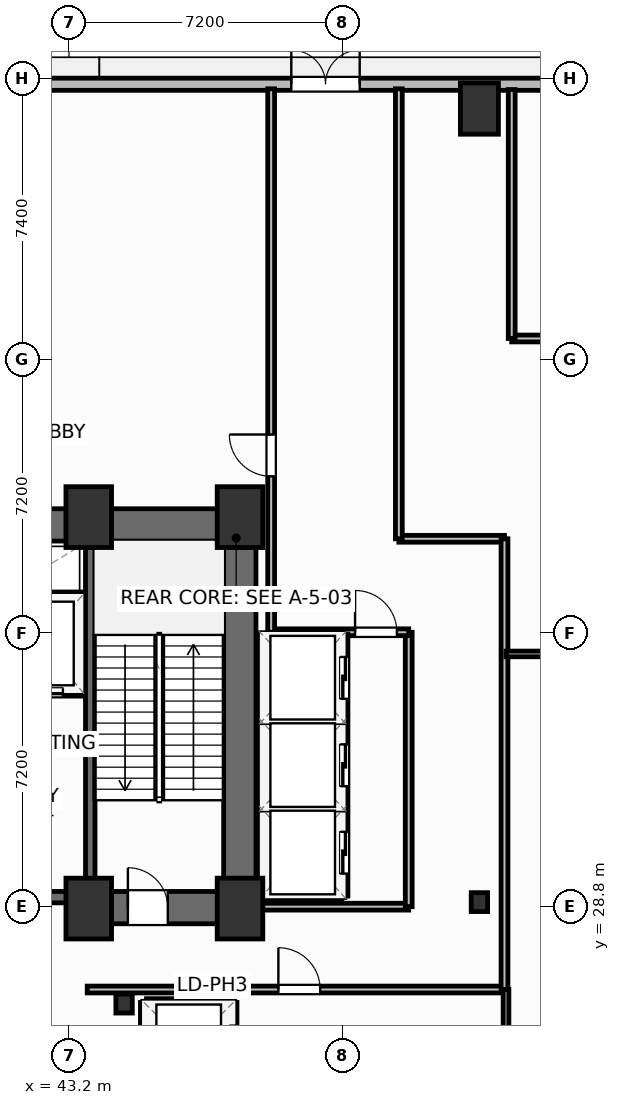
"""IFC4 building model, lengths in metres.
Left out: names, types, materials, properties, quantities, classifications, styles, units other than length and angle.
Written with IfcOpenShell. Run it as: python <this file> out.ifc"""

import sys

from ifc_helpers import new_model, si_unit, direction, frame, frame_2d, origin, origin_2d, place, context, subcontext, project, spatial, rectangle, i_section, extrude, element, fill, save


model = new_model("IFC4")
c1 = context("Model", 3, precision=1e-05, world=origin(), true_north=direction((0.0, 1.0)))
c2 = subcontext(c1, "Body", "Model", "MODEL_VIEW")
j1 = project(units=[si_unit("LENGTHUNIT", "METRE"), si_unit("PLANEANGLEUNIT", "RADIAN")], contexts=[c1])
p1 = place(None, origin())
s1 = spatial("IfcSite", under=j1, at=p1, CompositionType="ELEMENT")
p2 = place(p1, origin())
s2 = spatial("IfcBuilding", under=s1, at=p2, CompositionType="ELEMENT")
p3 = place(p2, origin())
s3 = spatial("IfcBuildingStorey", under=s2, at=p3, CompositionType="ELEMENT", Elevation=0.0)
for number, where, z_axis, x_axis in (
    (1, (43.72, 28.75, 0.0), (0.0, 0.0, 1.0), (1.0, 0.0, 0.0)),
    (2, (47.7, 28.75, 0.0), (0.0, 0.0, 1.0), (1.0, 0.0, 0.0)),
    (3, (43.72, 39.05, 0.0), (0.0, 0.0, 1.0), (1.0, 0.0, 0.0)),
    (4, (47.7, 39.05, 0.0), (0.0, 0.0, 1.0), (1.0, 0.0, 0.0)),
):
    element("IfcColumn", number, at=place(p3, frame(where, z_axis=z_axis, x_axis=x_axis)), inside=s3, PredefinedType="COLUMN", context=c2, shape_type="SweptSolid", body=[
        extrude(rectangle(XDim=1.2, YDim=1.6, at=origin_2d()), origin(), (0.0, 0.0, 1.0), 5.4),
    ])
for number, where, z_axis, x_axis in (
    (5, (44.65, 26.25, 0.0), (0.0, 0.0, 1.0), (1.0, 0.0, 0.0)),
    (6, (54.0, 28.92, 0.0), (0.0, 0.0, 1.0), (1.0, 0.0, 0.0)),
):
    element("IfcColumn", number, at=place(p3, frame(where, z_axis=z_axis, x_axis=x_axis)), inside=s3, PredefinedType="COLUMN", context=c2, shape_type="SweptSolid", body=[
        extrude(i_section(OverallWidth=0.432, OverallDepth=0.498, WebThickness=0.056, FlangeThickness=0.089, FilletRadius=0.025, at=origin_2d()), origin(), (0.0, 0.0, 1.0), 5.4),
    ])
p4 = place(p3, frame((30.28, 38.845, 0.0), z_axis=(0.0, 0.0, 1.0), x_axis=(1.0, 0.0, 0.0)))
e7 = element("IfcWall", 7, at=p4, inside=s3, PredefinedType="SHEAR", context=c2, shape_type="SweptSolid", body=[
    extrude(rectangle(XDim=17.84, YDim=0.85, at=frame_2d((8.92, 0.0))), origin(), (0.0, 0.0, 1.0), 5.12),
])
p5 = place(p3, frame((47.695, 29.2, 0.0), z_axis=(0.0, 0.0, 1.0), x_axis=(0.0, 1.0, 0.0)))
e8 = element("IfcWall", 8, at=p5, inside=s3, PredefinedType="SHEAR", context=c2, shape_type="SweptSolid", body=[
    extrude(rectangle(XDim=9.22, YDim=0.85, at=frame_2d((4.61, 0.0))), origin(), (0.0, 0.0, 1.0), 5.12),
])
p6 = place(p3, frame((43.6, 28.775, 0.0), z_axis=(0.0, 0.0, 1.0), x_axis=(1.0, 0.0, 0.0)))
e9 = element("IfcWall", 9, at=p6, inside=s3, PredefinedType="SHEAR", context=c2, shape_type="SweptSolid", body=[
    extrude(rectangle(XDim=4.52, YDim=0.85, at=frame_2d((2.26, 0.0))), origin(), (0.0, 0.0, 1.0), 5.12),
])
p7 = place(p6, frame((1.15, 0.0, 0.0)))
e10 = element("IfcOpeningElement", 10, at=p7, cuts=e9, PredefinedType="OPENING", context=c2, shape_type="SweptSolid", body=[
    extrude(rectangle(XDim=1.05, YDim=2.15, at=frame_2d((0.525, 1.075))), frame((0.0, 0.435, 0.0), z_axis=(0.0, -1.0, 0.0), x_axis=(1.0, 0.0, 0.0)), (0.0, 0.0, 1.0), 0.87),
])
p8 = place(p3, frame((34.8, 29.05, 0.0), z_axis=(0.0, 0.0, 1.0), x_axis=(1.0, 0.0, 0.0)))
e11 = element("IfcWall", 11, at=p8, inside=s3, PredefinedType="SHEAR", context=c2, shape_type="SweptSolid", body=[
    extrude(rectangle(XDim=8.8, YDim=0.3, at=frame_2d((4.4, 0.0))), origin(), (0.0, 0.0, 1.0), 5.12),
])
p9 = place(p8, frame((0.95, 0.0, 0.0)))
e12 = element("IfcOpeningElement", 12, at=p9, cuts=e11, PredefinedType="OPENING", context=c2, shape_type="SweptSolid", body=[
    extrude(rectangle(XDim=1.1, YDim=2.15, at=frame_2d((0.55, 1.075))), frame((0.0, 0.16, 0.0), z_axis=(0.0, -1.0, 0.0), x_axis=(1.0, 0.0, 0.0)), (0.0, 0.0, 1.0), 0.32),
])
p10 = place(p8, frame((6.75, 0.0, 0.0)))
e13 = element("IfcOpeningElement", 13, at=p10, cuts=e11, PredefinedType="OPENING", context=c2, shape_type="SweptSolid", body=[
    extrude(rectangle(XDim=1.1, YDim=2.15, at=frame_2d((0.55, 1.075))), frame((0.0, 0.16, 0.0), z_axis=(0.0, -1.0, 0.0), x_axis=(1.0, 0.0, 0.0)), (0.0, 0.0, 1.0), 0.32),
])
p11 = place(p8, frame((3.32, 0.0, 0.0)))
e14 = element("IfcOpeningElement", 14, at=p11, cuts=e11, PredefinedType="OPENING", context=c2, shape_type="SweptSolid", body=[
    extrude(rectangle(XDim=0.95, YDim=2.15, at=frame_2d((0.475, 1.075))), frame((0.0, 0.16, 0.0), z_axis=(0.0, -1.0, 0.0), x_axis=(1.0, 0.0, 0.0)), (0.0, 0.0, 1.0), 0.32),
])
p12 = place(p3, frame((43.76, 29.2, 0.0), z_axis=(0.0, 0.0, 1.0), x_axis=(0.0, 1.0, 0.0)))
e15 = element("IfcWall", 15, at=p12, inside=s3, PredefinedType="SHEAR", context=c2, shape_type="SweptSolid", body=[
    extrude(rectangle(XDim=9.22, YDim=0.25, at=frame_2d((4.61, 0.0))), origin(), (0.0, 0.0, 1.0), 5.12),
])
p13 = place(p3, frame((54.0, 49.8, 0.0), z_axis=(0.0, 0.0, 1.0), x_axis=(1.0, 0.0, 0.0)))
e16 = element("IfcColumn", 16, at=p13, inside=s3, PredefinedType="COLUMN", context=c2, shape_type="SweptSolid", body=[
    extrude(rectangle(XDim=1.0, YDim=1.35, at=origin_2d()), origin(), (0.0, 0.0, 1.0), 5.4),
])
p14 = place(p3, frame((5.6, 50.44, 0.0), z_axis=(0.0, 0.0, 1.0), x_axis=(1.0, 0.0, 0.0)))
e17 = element("IfcWall", 17, at=p14, inside=s3, PredefinedType="SOLIDWALL", context=c2, shape_type="SweptSolid", body=[
    extrude(rectangle(XDim=67.2, YDim=0.32, at=frame_2d((33.6, 0.0))), origin(), (0.0, 0.0, 1.0), 4.07),
])
p15 = place(p14, frame((10.05, 0.0, 0.0)))
e18 = element("IfcOpeningElement", 18, at=p15, cuts=e17, PredefinedType="OPENING", context=c2, shape_type="SweptSolid", body=[
    extrude(rectangle(XDim=1.8, YDim=2.2, at=frame_2d((0.9, 1.1))), frame((0.0, 0.17, 0.0), z_axis=(0.0, -1.0, 0.0), x_axis=(1.0, 0.0, 0.0)), (0.0, 0.0, 1.0), 0.34),
])
p16 = place(p14, frame((15.95, 0.0, 0.0)))
e19 = element("IfcOpeningElement", 19, at=p16, cuts=e17, PredefinedType="OPENING", context=c2, shape_type="SweptSolid", body=[
    extrude(rectangle(XDim=1.8, YDim=2.2, at=frame_2d((0.9, 1.1))), frame((0.0, 0.17, 0.0), z_axis=(0.0, -1.0, 0.0), x_axis=(1.0, 0.0, 0.0)), (0.0, 0.0, 1.0), 0.34),
])
p17 = place(p14, frame((43.45, 0.0, 0.0)))
e20 = element("IfcOpeningElement", 20, at=p17, cuts=e17, PredefinedType="OPENING", context=c2, shape_type="SweptSolid", body=[
    extrude(rectangle(XDim=1.8, YDim=2.2, at=frame_2d((0.9, 1.1))), frame((0.0, 0.17, 0.0), z_axis=(0.0, -1.0, 0.0), x_axis=(1.0, 0.0, 0.0)), (0.0, 0.0, 1.0), 0.34),
])
p18 = place(p14, frame((50.5, 0.0, 0.0)))
e21 = element("IfcOpeningElement", 21, at=p18, cuts=e17, PredefinedType="OPENING", context=c2, shape_type="SweptSolid", body=[
    extrude(rectangle(XDim=1.8, YDim=2.2, at=frame_2d((0.9, 1.1))), frame((0.0, 0.17, 0.0), z_axis=(0.0, -1.0, 0.0), x_axis=(1.0, 0.0, 0.0)), (0.0, 0.0, 1.0), 0.34),
])
p19 = place(p14, frame((57.8, 0.0, 0.0)))
e22 = element("IfcOpeningElement", 22, at=p19, cuts=e17, PredefinedType="OPENING", context=c2, shape_type="SweptSolid", body=[
    extrude(rectangle(XDim=6.0, YDim=3.2, at=frame_2d((3.0, 1.6))), frame((0.0, 0.17, 0.0), z_axis=(0.0, -1.0, 0.0), x_axis=(1.0, 0.0, 0.0)), (0.0, 0.0, 1.0), 0.34),
])
p20 = place(p3, frame((43.68, 26.62, 0.0), z_axis=(0.0, 0.0, 1.0), x_axis=(1.0, 0.0, 0.0)))
e23 = element("IfcWall", 23, at=p20, inside=s3, PredefinedType="PARTITIONING", context=c2, shape_type="SweptSolid", body=[
    extrude(rectangle(XDim=10.98, YDim=0.18, at=frame_2d((5.49, 0.0))), origin(), (0.0, 0.0, 1.0), 5.12),
])
p21 = place(p20, frame((5.03, 0.0, 0.0)))
e24 = element("IfcOpeningElement", 24, at=p21, cuts=e23, PredefinedType="OPENING", context=c2, shape_type="SweptSolid", body=[
    extrude(rectangle(XDim=1.1, YDim=2.15, at=frame_2d((0.55, 1.075))), frame((0.0, 0.1, 0.0), z_axis=(0.0, -1.0, 0.0), x_axis=(1.0, 0.0, 0.0)), (0.0, 0.0, 1.0), 0.2),
])
p22 = place(p3, frame((48.12, 28.8, 0.0), z_axis=(0.0, 0.0, 1.0), x_axis=(1.0, 0.0, 0.0)))
e25 = element("IfcWall", 25, at=p22, inside=s3, PredefinedType="PARTITIONING", context=c2, shape_type="SweptSolid", body=[
    extrude(rectangle(XDim=4.02, YDim=0.18, at=frame_2d((2.01, 0.0))), origin(), (0.0, 0.0, 1.0), 4.332),
])
p23 = place(p3, frame((52.14, 28.8, 0.0), z_axis=(0.0, 0.0, 1.0), x_axis=(0.0, 1.0, 0.0)))
e26 = element("IfcWall", 26, at=p23, inside=s3, PredefinedType="PARTITIONING", context=c2, shape_type="SweptSolid", body=[
    extrude(rectangle(XDim=7.22, YDim=0.18, at=frame_2d((3.61, 0.0))), origin(), (0.0, 0.0, 1.0), 5.12),
])
p24 = place(p3, frame((48.52, 36.02, 0.0), z_axis=(0.0, 0.0, 1.0), x_axis=(1.0, 0.0, 0.0)))
e27 = element("IfcWall", 27, at=p24, inside=s3, PredefinedType="PARTITIONING", context=c2, shape_type="SweptSolid", body=[
    extrude(rectangle(XDim=3.62, YDim=0.18, at=frame_2d((1.81, 0.0))), origin(), (0.0, 0.0, 1.0), 5.12),
])
p25 = place(p24, frame((2.208, 0.0, 0.0)))
e28 = element("IfcOpeningElement", 28, at=p25, cuts=e27, PredefinedType="OPENING", context=c2, shape_type="SweptSolid", body=[
    extrude(rectangle(XDim=1.1, YDim=2.15, at=frame_2d((0.55, 1.075))), frame((0.0, 0.1, 0.0), z_axis=(0.0, -1.0, 0.0), x_axis=(1.0, 0.0, 0.0)), (0.0, 0.0, 1.0), 0.2),
])
p26 = place(p3, frame((48.52, 36.02, 0.0), z_axis=(0.0, 0.0, 1.0), x_axis=(0.0, 1.0, 0.0)))
e29 = element("IfcWall", 29, at=p26, inside=s3, PredefinedType="PARTITIONING", context=c2, shape_type="SweptSolid", body=[
    extrude(rectangle(XDim=14.3, YDim=0.18, at=frame_2d((7.15, 0.0))), origin(), (0.0, 0.0, 1.0), 5.12),
])
p27 = place(p26, frame((4.103, 0.0, 0.0)))
e30 = element("IfcOpeningElement", 30, at=p27, cuts=e29, PredefinedType="OPENING", context=c2, shape_type="SweptSolid", body=[
    extrude(rectangle(XDim=1.1, YDim=2.15, at=frame_2d((0.55, 1.075))), frame((0.0, 0.1, 0.0), z_axis=(0.0, -1.0, 0.0), x_axis=(1.0, 0.0, 0.0)), (0.0, 0.0, 1.0), 0.2),
])
p28 = place(p3, frame((51.88, 38.48, 0.0), z_axis=(0.0, 0.0, 1.0), x_axis=(1.0, 0.0, 0.0)))
e31 = element("IfcWall", 31, at=p28, inside=s3, PredefinedType="PARTITIONING", context=c2, shape_type="SweptSolid", body=[
    extrude(rectangle(XDim=2.78, YDim=0.18, at=frame_2d((1.39, 0.0))), origin(), (0.0, 0.0, 1.0), 4.085),
])
p29 = place(p3, frame((51.88, 38.48, 0.0), z_axis=(0.0, 0.0, 1.0), x_axis=(0.0, 1.0, 0.0)))
e32 = element("IfcWall", 32, at=p29, inside=s3, PredefinedType="PARTITIONING", context=c2, shape_type="SweptSolid", body=[
    extrude(rectangle(XDim=11.84, YDim=0.18, at=frame_2d((5.92, 0.0))), origin(), (0.0, 0.0, 1.0), 5.12),
])
p30 = place(p3, frame((54.66, 26.62, 0.0), z_axis=(0.0, 0.0, 1.0), x_axis=(0.0, 1.0, 0.0)))
e33 = element("IfcWall", 33, at=p30, inside=s3, PredefinedType="PARTITIONING", context=c2, shape_type="SweptSolid", body=[
    extrude(rectangle(XDim=11.86, YDim=0.18, at=frame_2d((5.93, 0.0))), origin(), (0.0, 0.0, 1.0), 5.12),
])
p31 = place(p3, frame((54.85, 43.75, 0.0), z_axis=(0.0, 0.0, 1.0), x_axis=(1.0, 0.0, 0.0)))
e34 = element("IfcWall", 34, at=p31, inside=s3, PredefinedType="PARTITIONING", context=c2, shape_type="SweptSolid", body=[
    extrude(rectangle(XDim=6.2, YDim=0.18, at=frame_2d((3.1, 0.0))), origin(), (0.0, 0.0, 1.0), 5.12),
])
p32 = place(p31, frame((2.2, 0.0, 0.0)))
e35 = element("IfcOpeningElement", 35, at=p32, cuts=e34, PredefinedType="OPENING", context=c2, shape_type="SweptSolid", body=[
    extrude(rectangle(XDim=1.1, YDim=2.15, at=frame_2d((0.55, 1.075))), frame((0.0, 0.1, 0.0), z_axis=(0.0, -1.0, 0.0), x_axis=(1.0, 0.0, 0.0)), (0.0, 0.0, 1.0), 0.2),
])
p33 = place(p3, frame((54.85, 43.75, 0.0), z_axis=(0.0, 0.0, 1.0), x_axis=(0.0, 1.0, 0.0)))
e36 = element("IfcWall", 36, at=p33, inside=s3, PredefinedType="PARTITIONING", context=c2, shape_type="SweptSolid", body=[
    extrude(rectangle(XDim=6.55, YDim=0.18, at=frame_2d((3.275, 0.0))), origin(), (0.0, 0.0, 1.0), 5.12),
])
p34 = place(p3, frame((54.7, 18.14, 0.0), z_axis=(0.0, 0.0, 1.0), x_axis=(0.0, 1.0, 0.0)))
e37 = element("IfcWall", 37, at=p34, inside=s3, PredefinedType="PARTITIONING", context=c2, shape_type="SweptSolid", body=[
    extrude(rectangle(XDim=8.48, YDim=0.15, at=frame_2d((4.24, 0.0))), origin(), (0.0, 0.0, 1.0), 5.12),
])
p35 = place(p3, frame((54.7, 35.45, 0.0), z_axis=(0.0, 0.0, 1.0), x_axis=(1.0, 0.0, 0.0)))
e38 = element("IfcWall", 38, at=p35, inside=s3, PredefinedType="PARTITIONING", context=c2, shape_type="SweptSolid", body=[
    extrude(rectangle(XDim=17.8, YDim=0.15, at=frame_2d((8.9, 0.0))), origin(), (0.0, 0.0, 1.0), 5.12),
])
p36 = place(p3, frame((41.42, 34.44, 0.0), z_axis=(0.0, 0.0, 1.0), x_axis=(1.0, 0.0, 0.0)))
e39 = element("IfcWall", 39, at=p36, inside=s3, PredefinedType="PARTITIONING", context=c2, shape_type="SweptSolid", body=[
    extrude(rectangle(XDim=2.18, YDim=0.2, at=frame_2d((1.09, 0.0))), origin(), (0.0, 0.0, 1.0), 5.12),
])
p37 = place(p36, frame((0.42, 0.0, 0.0)))
e40 = element("IfcOpeningElement", 40, at=p37, cuts=e39, PredefinedType="OPENING", context=c2, shape_type="SweptSolid", body=[
    extrude(rectangle(XDim=1.2, YDim=2.2, at=frame_2d((0.6, 1.1))), frame((0.0, 0.11, 0.0), z_axis=(0.0, -1.0, 0.0), x_axis=(1.0, 0.0, 0.0)), (0.0, 0.0, 1.0), 0.22),
])
p38 = place(p3, frame((41.42, 36.98, 0.0), z_axis=(0.0, 0.0, 1.0), x_axis=(1.0, 0.0, 0.0)))
e41 = element("IfcWall", 41, at=p38, inside=s3, PredefinedType="PARTITIONING", context=c2, shape_type="SweptSolid", body=[
    extrude(rectangle(XDim=2.18, YDim=0.2, at=frame_2d((1.09, 0.0))), origin(), (0.0, 0.0, 1.0), 5.12),
])
for number, where, z_axis, x_axis in (
    (42, (48.32, 31.375, 0.0), (0.0, 0.0, 1.0), (1.0, 0.0, 0.0)),
    (43, (48.32, 33.675, 0.0), (0.0, 0.0, 1.0), (1.0, 0.0, 0.0)),
):
    element("IfcWall", number, at=place(p3, frame(where, z_axis=z_axis, x_axis=x_axis)), inside=s3, PredefinedType="PARTITIONING", context=c2, shape_type="SweptSolid", body=[
        extrude(rectangle(XDim=2.06, YDim=0.2, at=frame_2d((1.03, 0.0))), origin(), (0.0, 0.0, 1.0), 5.12),
    ])
p39 = place(p3, frame((48.32, 29.08, 0.0), z_axis=(0.0, 0.0, 1.0), x_axis=(1.0, 0.0, 0.0)))
e44 = element("IfcWall", 44, at=p39, inside=s3, PredefinedType="PARTITIONING", context=c2, shape_type="SweptSolid", body=[
    extrude(rectangle(XDim=2.06, YDim=0.2, at=frame_2d((1.03, 0.0))), origin(), (0.0, 0.0, 1.0), 4.332),
])
p40 = place(p3, frame((48.28, 29.08, 0.0), z_axis=(0.0, 0.0, 1.0), x_axis=(0.0, 1.0, 0.0)))
e45 = element("IfcWall", 45, at=p40, inside=s3, PredefinedType="PARTITIONING", context=c2, shape_type="SweptSolid", body=[
    extrude(rectangle(XDim=6.89, YDim=0.2, at=frame_2d((3.445, 0.0))), origin(), (0.0, 0.0, 1.0), 5.12),
])
p41 = place(p3, frame((50.44, 29.08, 0.0), z_axis=(0.0, 0.0, 1.0), x_axis=(0.0, 1.0, 0.0)))
e46 = element("IfcWall", 46, at=p41, inside=s3, PredefinedType="PARTITIONING", context=c2, shape_type="SweptSolid", body=[
    extrude(rectangle(XDim=6.89, YDim=0.2, at=frame_2d((3.445, 0.0))), origin(), (0.0, 0.0, 1.0), 5.12),
])
p42 = place(p41, frame((0.59, 0.0, 0.0)))
e47 = element("IfcOpeningElement", 47, at=p42, cuts=e46, PredefinedType="OPENING", context=c2, shape_type="SweptSolid", body=[
    extrude(rectangle(XDim=1.1, YDim=2.15, at=frame_2d((0.55, 1.075))), frame((0.0, 0.11, 0.0), z_axis=(0.0, -1.0, 0.0), x_axis=(1.0, 0.0, 0.0)), (0.0, 0.0, 1.0), 0.22),
])
p43 = place(p41, frame((2.89, 0.0, 0.0)))
e48 = element("IfcOpeningElement", 48, at=p43, cuts=e46, PredefinedType="OPENING", context=c2, shape_type="SweptSolid", body=[
    extrude(rectangle(XDim=1.1, YDim=2.15, at=frame_2d((0.55, 1.075))), frame((0.0, 0.11, 0.0), z_axis=(0.0, -1.0, 0.0), x_axis=(1.0, 0.0, 0.0)), (0.0, 0.0, 1.0), 0.22),
])
p44 = place(p41, frame((5.19, 0.0, 0.0)))
e49 = element("IfcOpeningElement", 49, at=p44, cuts=e46, PredefinedType="OPENING", context=c2, shape_type="SweptSolid", body=[
    extrude(rectangle(XDim=1.1, YDim=2.15, at=frame_2d((0.55, 1.075))), frame((0.0, 0.11, 0.0), z_axis=(0.0, -1.0, 0.0), x_axis=(1.0, 0.0, 0.0)), (0.0, 0.0, 1.0), 0.22),
])
p45 = place(p3, frame((45.24, 26.28, 0.0), z_axis=(0.0, 0.0, 1.0), x_axis=(1.0, 0.0, 0.0)))
e50 = element("IfcWall", 50, at=p45, inside=s3, PredefinedType="PARTITIONING", context=c2, shape_type="SweptSolid", body=[
    extrude(rectangle(XDim=2.22, YDim=0.2, at=frame_2d((1.11, 0.0))), origin(), (0.0, 0.0, 1.0), 5.12),
])
p46 = place(p3, frame((45.18, 19.38, 0.0), z_axis=(0.0, 0.0, 1.0), x_axis=(0.0, 1.0, 0.0)))
e51 = element("IfcWall", 51, at=p46, inside=s3, PredefinedType="PARTITIONING", context=c2, shape_type="SweptSolid", body=[
    extrude(rectangle(XDim=6.9, YDim=0.2, at=frame_2d((3.45, 0.0))), origin(), (0.0, 0.0, 1.0), 5.12),
])
p47 = place(p3, frame((47.52, 19.38, 0.0), z_axis=(0.0, 0.0, 1.0), x_axis=(0.0, 1.0, 0.0)))
e52 = element("IfcWall", 52, at=p47, inside=s3, PredefinedType="PARTITIONING", context=c2, shape_type="SweptSolid", body=[
    extrude(rectangle(XDim=6.9, YDim=0.2, at=frame_2d((3.45, 0.0))), origin(), (0.0, 0.0, 1.0), 5.12),
])
p48 = place(p47, frame((0.59, 0.0, 0.0)))
e53 = element("IfcOpeningElement", 53, at=p48, cuts=e52, PredefinedType="OPENING", context=c2, shape_type="SweptSolid", body=[
    extrude(rectangle(XDim=1.1, YDim=2.15, at=frame_2d((0.55, 1.075))), frame((0.0, 0.11, 0.0), z_axis=(0.0, -1.0, 0.0), x_axis=(1.0, 0.0, 0.0)), (0.0, 0.0, 1.0), 0.22),
])
p49 = place(p47, frame((2.89, 0.0, 0.0)))
e54 = element("IfcOpeningElement", 54, at=p49, cuts=e52, PredefinedType="OPENING", context=c2, shape_type="SweptSolid", body=[
    extrude(rectangle(XDim=1.1, YDim=2.15, at=frame_2d((0.55, 1.075))), frame((0.0, 0.11, 0.0), z_axis=(0.0, -1.0, 0.0), x_axis=(1.0, 0.0, 0.0)), (0.0, 0.0, 1.0), 0.22),
])
p50 = place(p47, frame((5.19, 0.0, 0.0)))
e55 = element("IfcOpeningElement", 55, at=p50, cuts=e52, PredefinedType="OPENING", context=c2, shape_type="SweptSolid", body=[
    extrude(rectangle(XDim=1.1, YDim=2.15, at=frame_2d((0.55, 1.075))), frame((0.0, 0.11, 0.0), z_axis=(0.0, -1.0, 0.0), x_axis=(1.0, 0.0, 0.0)), (0.0, 0.0, 1.0), 0.22),
])
p51 = place(p17, origin())
e56 = element("IfcDoor", 56, at=p51, inside=s3, OperationType="DOUBLE_DOOR_SINGLE_SWING", PredefinedType="DOOR", context=c2, shape_type="SweptSolid", body=[
    extrude(rectangle(XDim=1.8, YDim=2.2, at=frame_2d((0.9, 1.1))), frame((0.0, 0.025, 0.0), z_axis=(0.0, -1.0, 0.0), x_axis=(1.0, 0.0, 0.0)), (0.0, 0.0, 1.0), 0.05),
])
fill(e20, e56)
p52 = place(p21, origin())
e57 = element("IfcDoor", 57, at=p52, inside=s3, OperationType="SINGLE_SWING_LEFT", PredefinedType="DOOR", context=c2, shape_type="SweptSolid", body=[
    extrude(rectangle(XDim=1.1, YDim=2.15, at=frame_2d((0.55, 1.075))), frame((0.0, 0.025, 0.0), z_axis=(0.0, -1.0, 0.0), x_axis=(1.0, 0.0, 0.0)), (0.0, 0.0, 1.0), 0.05),
])
fill(e24, e57)
p53 = place(p25, origin())
e58 = element("IfcDoor", 58, at=p53, inside=s3, OperationType="SINGLE_SWING_LEFT", PredefinedType="DOOR", context=c2, shape_type="SweptSolid", body=[
    extrude(rectangle(XDim=1.1, YDim=2.15, at=frame_2d((0.55, 1.075))), frame((0.0, 0.025, 0.0), z_axis=(0.0, -1.0, 0.0), x_axis=(1.0, 0.0, 0.0)), (0.0, 0.0, 1.0), 0.05),
])
fill(e28, e58)
p54 = place(p27, origin())
e59 = element("IfcDoor", 59, at=p54, inside=s3, OperationType="SINGLE_SWING_RIGHT", PredefinedType="DOOR", context=c2, shape_type="SweptSolid", body=[
    extrude(rectangle(XDim=1.1, YDim=2.15, at=frame_2d((0.55, 1.075))), frame((0.0, 0.025, 0.0), z_axis=(0.0, -1.0, 0.0), x_axis=(1.0, 0.0, 0.0)), (0.0, 0.0, 1.0), 0.05),
])
fill(e30, e59)
p55 = place(p7, origin())
e60 = element("IfcDoor", 60, at=p55, inside=s3, OperationType="SINGLE_SWING_LEFT", PredefinedType="DOOR", context=c2, shape_type="SweptSolid", body=[
    extrude(rectangle(XDim=1.05, YDim=2.15, at=frame_2d((0.525, 1.075))), frame((0.0, 0.025, 0.0), z_axis=(0.0, -1.0, 0.0), x_axis=(1.0, 0.0, 0.0)), (0.0, 0.0, 1.0), 0.05),
])
fill(e10, e60)
p56 = place(p37, origin())
e61 = element("IfcDoor", 61, at=p56, inside=s3, OperationType="SLIDING_TO_LEFT", PredefinedType="DOOR", context=c2, shape_type="SweptSolid", body=[
    extrude(rectangle(XDim=1.2, YDim=2.2, at=frame_2d((0.6, 1.1))), frame((0.0, 0.025, 0.0), z_axis=(0.0, -1.0, 0.0), x_axis=(1.0, 0.0, 0.0)), (0.0, 0.0, 1.0), 0.05),
])
fill(e40, e61)
p57 = place(p42, origin())
e62 = element("IfcDoor", 62, at=p57, inside=s3, OperationType="SLIDING_TO_LEFT", PredefinedType="DOOR", context=c2, shape_type="SweptSolid", body=[
    extrude(rectangle(XDim=1.1, YDim=2.15, at=frame_2d((0.55, 1.075))), frame((0.0, 0.025, 0.0), z_axis=(0.0, -1.0, 0.0), x_axis=(1.0, 0.0, 0.0)), (0.0, 0.0, 1.0), 0.05),
])
fill(e47, e62)
p58 = place(p43, origin())
e63 = element("IfcDoor", 63, at=p58, inside=s3, OperationType="SLIDING_TO_LEFT", PredefinedType="DOOR", context=c2, shape_type="SweptSolid", body=[
    extrude(rectangle(XDim=1.1, YDim=2.15, at=frame_2d((0.55, 1.075))), frame((0.0, 0.025, 0.0), z_axis=(0.0, -1.0, 0.0), x_axis=(1.0, 0.0, 0.0)), (0.0, 0.0, 1.0), 0.05),
])
fill(e48, e63)
p59 = place(p44, origin())
e64 = element("IfcDoor", 64, at=p59, inside=s3, OperationType="SLIDING_TO_LEFT", PredefinedType="DOOR", context=c2, shape_type="SweptSolid", body=[
    extrude(rectangle(XDim=1.1, YDim=2.15, at=frame_2d((0.55, 1.075))), frame((0.0, 0.025, 0.0), z_axis=(0.0, -1.0, 0.0), x_axis=(1.0, 0.0, 0.0)), (0.0, 0.0, 1.0), 0.05),
])
fill(e49, e64)
save(model, sys.argv[1])
